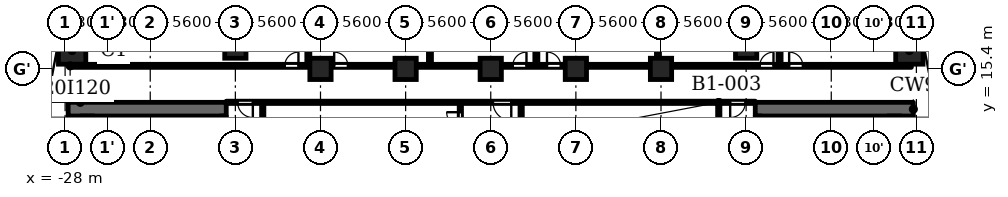
"""IFC4 building model, lengths in metres.
Left out: names, types, materials, properties, quantities, classifications, styles, units other than length and angle.
Written with IfcOpenShell. Run it as: python <this file> out.ifc"""

import sys

from ifc_helpers import new_model, si_unit, direction, frame, frame_2d, origin, origin_2d, place, context, subcontext, project, spatial, polyline, rectangle, outline, extrude, element, fill, save


model = new_model("IFC4")
c1 = context("Model", 3, precision=1e-05, world=origin(), true_north=direction((0.0, 1.0)))
c2 = subcontext(c1, "Body", "Model", "MODEL_VIEW")
j1 = project(units=[si_unit("LENGTHUNIT", "METRE"), si_unit("PLANEANGLEUNIT", "RADIAN")], contexts=[c1])
p1 = place(None, origin())
s1 = spatial("IfcSite", under=j1, at=p1, CompositionType="ELEMENT")
p2 = place(p1, origin())
s2 = spatial("IfcBuilding", under=s1, at=p2, CompositionType="ELEMENT")
p3 = place(p2, frame((0.0, 0.0, -4.5)))
s3 = spatial("IfcBuildingStorey", under=s2, at=p3, CompositionType="ELEMENT", Elevation=-4.5)
p4 = place(p3, frame((0.0, 0.0, -0.5)))
e1 = element("IfcWall", 1, at=p4, inside=s3, PredefinedType="SOLIDWALL", context=c2, shape_type="SweptSolid", body=[
    extrude(outline(polyline([(-29.45, 10.0), (-28.95, 10.0), (-28.95, 14.49), (-28.472, 16.996), (-27.038, 19.105), (-26.144, 20.0), (-26.851, 20.0), (-27.425, 19.426), (-28.944, 17.191), (-29.45, 14.537), (-29.45, 10.0)])), origin(), (0.0, 0.0, 1.0), 5.0),
])
e2 = element("IfcWall", 2, at=p4, inside=s3, PredefinedType="SOLIDWALL", context=c2, shape_type="SweptSolid", body=[
    extrude(outline(polyline([(26.851, 20.0), (26.144, 20.0), (27.038, 19.105), (28.472, 16.996), (28.95, 14.49), (28.95, 10.0), (29.45, 10.0), (29.45, 14.537), (28.944, 17.191), (27.425, 19.426), (26.851, 20.0)])), origin(), (0.0, 0.0, 1.0), 5.0),
])
for number, where, z_axis, x_axis in (
    (3, (27.538, 16.609, 0.0), (0.0, 0.0, 1.0), (1.0, 0.0, 0.0)),
    (4, (-27.538, 16.609, 0.0), (0.0, 0.0, 1.0), (1.0, 0.0, 0.0)),
):
    element("IfcColumn", number, at=place(p3, frame(where, z_axis=z_axis, x_axis=x_axis)), inside=s3, PredefinedType="COLUMN", context=c2, shape_type="SweptSolid", body=[
        extrude(rectangle(XDim=1.8, YDim=1.8, at=origin_2d()), origin(), (0.0, 0.0, 1.0), 4.5),
    ])
for number, where, z_axis, x_axis in (
    (5, (-16.8, 16.8, 0.0), (0.0, 0.0, 1.0), (1.0, 0.0, 0.0)),
    (6, (16.8, 16.8, 0.0), (0.0, 0.0, 1.0), (1.0, 0.0, 0.0)),
    (7, (-11.2, 15.4, 0.0), (0.0, 0.0, 1.0), (1.0, 0.0, 0.0)),
    (8, (-5.6, 15.4, 0.0), (0.0, 0.0, 1.0), (1.0, 0.0, 0.0)),
    (9, (0.0, 15.4, 0.0), (0.0, 0.0, 1.0), (1.0, 0.0, 0.0)),
    (10, (5.6, 15.4, 0.0), (0.0, 0.0, 1.0), (1.0, 0.0, 0.0)),
    (11, (11.2, 15.4, 0.0), (0.0, 0.0, 1.0), (1.0, 0.0, 0.0)),
):
    element("IfcColumn", number, at=place(p3, frame(where, z_axis=z_axis, x_axis=x_axis)), inside=s3, PredefinedType="COLUMN", context=c2, shape_type="SweptSolid", body=[
        extrude(rectangle(XDim=1.4, YDim=1.4, at=origin_2d()), origin(), (0.0, 0.0, 1.0), 4.5),
    ])
p5 = place(p3, frame((-17.4, 12.75, 0.0), z_axis=(0.0, 0.0, 1.0), x_axis=(-1.0, 0.0, 0.0)))
e12 = element("IfcWall", 12, at=p5, inside=s3, PredefinedType="SHEAR", context=c2, shape_type="SweptSolid", body=[
    extrude(rectangle(XDim=10.4, YDim=0.9, at=frame_2d((5.2, 0.0))), origin(), (0.0, 0.0, 1.0), 4.05),
])
p6 = place(p3, frame((-17.6, -12.3, 0.0), z_axis=(0.0, 0.0, 1.0), x_axis=(0.0, 1.0, 0.0)))
e13 = element("IfcWall", 13, at=p6, inside=s3, PredefinedType="SHEAR", context=c2, shape_type="SweptSolid", body=[
    extrude(rectangle(XDim=24.6, YDim=0.4, at=frame_2d((12.3, 0.0))), origin(), (0.0, 0.0, 1.0), 4.05),
])
p7 = place(p6, frame((6.0, 0.0, 0.0)))
e14 = element("IfcOpeningElement", 14, at=p7, cuts=e13, PredefinedType="OPENING", context=c2, shape_type="SweptSolid", body=[
    extrude(rectangle(XDim=1.1, YDim=2.1, at=frame_2d((0.55, 1.05))), frame((0.0, 0.21, 0.0), z_axis=(0.0, -1.0, 0.0), x_axis=(1.0, 0.0, 0.0)), (0.0, 0.0, 1.0), 0.42),
])
p8 = place(p6, frame((8.4, 0.0, 0.0)))
e15 = element("IfcOpeningElement", 15, at=p8, cuts=e13, PredefinedType="OPENING", context=c2, shape_type="SweptSolid", body=[
    extrude(rectangle(XDim=1.1, YDim=2.1, at=frame_2d((0.55, 1.05))), frame((0.0, 0.21, 0.0), z_axis=(0.0, -1.0, 0.0), x_axis=(1.0, 0.0, 0.0)), (0.0, 0.0, 1.0), 0.42),
])
p9 = place(p6, frame((10.8, 0.0, 0.0)))
e16 = element("IfcOpeningElement", 16, at=p9, cuts=e13, PredefinedType="OPENING", context=c2, shape_type="SweptSolid", body=[
    extrude(rectangle(XDim=1.1, YDim=2.1, at=frame_2d((0.55, 1.05))), frame((0.0, 0.21, 0.0), z_axis=(0.0, -1.0, 0.0), x_axis=(1.0, 0.0, 0.0)), (0.0, 0.0, 1.0), 0.42),
])
p10 = place(p6, frame((16.75, 0.0, 0.0)))
e17 = element("IfcOpeningElement", 17, at=p10, cuts=e13, PredefinedType="OPENING", context=c2, shape_type="SweptSolid", body=[
    extrude(rectangle(XDim=0.9, YDim=2.1, at=frame_2d((0.45, 1.05))), frame((0.0, 0.21, 0.0), z_axis=(0.0, -1.0, 0.0), x_axis=(1.0, 0.0, 0.0)), (0.0, 0.0, 1.0), 0.42),
])
p11 = place(p6, frame((22.8, 0.0, 0.0)))
e18 = element("IfcOpeningElement", 18, at=p11, cuts=e13, PredefinedType="OPENING", context=c2, shape_type="SweptSolid", body=[
    extrude(rectangle(XDim=1.1, YDim=2.1, at=frame_2d((0.55, 1.05))), frame((0.0, 0.21, 0.0), z_axis=(0.0, -1.0, 0.0), x_axis=(1.0, 0.0, 0.0)), (0.0, 0.0, 1.0), 0.42),
])
p12 = place(p6, frame((0.7, 0.0, 0.0)))
e19 = element("IfcOpeningElement", 19, at=p12, cuts=e13, PredefinedType="OPENING", context=c2, shape_type="SweptSolid", body=[
    extrude(rectangle(XDim=1.1, YDim=2.1, at=frame_2d((0.55, 1.05))), frame((0.0, 0.21, 0.0), z_axis=(0.0, -1.0, 0.0), x_axis=(1.0, 0.0, 0.0)), (0.0, 0.0, 1.0), 0.42),
])
p13 = place(p6, frame((12.775, 0.0, 0.0)))
e20 = element("IfcOpeningElement", 20, at=p13, cuts=e13, PredefinedType="OPENING", context=c2, shape_type="SweptSolid", body=[
    extrude(rectangle(XDim=1.8, YDim=2.1, at=frame_2d((0.9, 1.05))), frame((0.0, 0.21, 0.0), z_axis=(0.0, -1.0, 0.0), x_axis=(1.0, 0.0, 0.0)), (0.0, 0.0, 1.0), 0.42),
])
p14 = place(p3, frame((-26.55, -12.3, 0.0), z_axis=(0.0, 0.0, 1.0), x_axis=(0.0, 1.0, 0.0)))
e21 = element("IfcWall", 21, at=p14, inside=s3, PredefinedType="SHEAR", context=c2, shape_type="SweptSolid", body=[
    extrude(rectangle(XDim=24.6, YDim=0.9, at=frame_2d((12.3, 0.0))), origin(), (0.0, 0.0, 1.0), 4.05),
])
p15 = place(p3, frame((-23.55, 9.8, 0.0), z_axis=(0.0, 0.0, 1.0), x_axis=(0.0, 1.0, 0.0)))
e22 = element("IfcWall", 22, at=p15, inside=s3, PredefinedType="PARTITIONING", context=c2, shape_type="SweptSolid", body=[
    extrude(rectangle(XDim=2.5, YDim=0.2, at=frame_2d((1.25, 0.0))), origin(), (0.0, 0.0, 1.0), 4.05),
])
p16 = place(p15, frame((0.8, 0.0, 0.0)))
e23 = element("IfcOpeningElement", 23, at=p16, cuts=e22, PredefinedType="OPENING", context=c2, shape_type="SweptSolid", body=[
    extrude(rectangle(XDim=0.9, YDim=2.1, at=frame_2d((0.45, 1.05))), frame((0.0, 0.11, 0.0), z_axis=(0.0, -1.0, 0.0), x_axis=(1.0, 0.0, 0.0)), (0.0, 0.0, 1.0), 0.22),
])
p17 = place(p3, frame((17.4, 12.75, 0.0), z_axis=(0.0, 0.0, 1.0), x_axis=(1.0, 0.0, 0.0)))
e24 = element("IfcWall", 24, at=p17, inside=s3, PredefinedType="SHEAR", context=c2, shape_type="SweptSolid", body=[
    extrude(rectangle(XDim=10.4, YDim=0.9, at=frame_2d((5.2, 0.0))), origin(), (0.0, 0.0, 1.0), 4.05),
])
p18 = place(p3, frame((17.6, -12.3, 0.0), z_axis=(0.0, 0.0, 1.0), x_axis=(0.0, 1.0, 0.0)))
e25 = element("IfcWall", 25, at=p18, inside=s3, PredefinedType="SHEAR", context=c2, shape_type="SweptSolid", body=[
    extrude(rectangle(XDim=24.6, YDim=0.4, at=frame_2d((12.3, 0.0))), origin(), (0.0, 0.0, 1.0), 4.05),
])
p19 = place(p18, frame((6.0, 0.0, 0.0)))
e26 = element("IfcOpeningElement", 26, at=p19, cuts=e25, PredefinedType="OPENING", context=c2, shape_type="SweptSolid", body=[
    extrude(rectangle(XDim=1.1, YDim=2.1, at=frame_2d((0.55, 1.05))), frame((0.0, 0.21, 0.0), z_axis=(0.0, -1.0, 0.0), x_axis=(1.0, 0.0, 0.0)), (0.0, 0.0, 1.0), 0.42),
])
p20 = place(p18, frame((8.4, 0.0, 0.0)))
e27 = element("IfcOpeningElement", 27, at=p20, cuts=e25, PredefinedType="OPENING", context=c2, shape_type="SweptSolid", body=[
    extrude(rectangle(XDim=1.1, YDim=2.1, at=frame_2d((0.55, 1.05))), frame((0.0, 0.21, 0.0), z_axis=(0.0, -1.0, 0.0), x_axis=(1.0, 0.0, 0.0)), (0.0, 0.0, 1.0), 0.42),
])
p21 = place(p18, frame((10.8, 0.0, 0.0)))
e28 = element("IfcOpeningElement", 28, at=p21, cuts=e25, PredefinedType="OPENING", context=c2, shape_type="SweptSolid", body=[
    extrude(rectangle(XDim=1.1, YDim=2.1, at=frame_2d((0.55, 1.05))), frame((0.0, 0.21, 0.0), z_axis=(0.0, -1.0, 0.0), x_axis=(1.0, 0.0, 0.0)), (0.0, 0.0, 1.0), 0.42),
])
p22 = place(p18, frame((16.75, 0.0, 0.0)))
e29 = element("IfcOpeningElement", 29, at=p22, cuts=e25, PredefinedType="OPENING", context=c2, shape_type="SweptSolid", body=[
    extrude(rectangle(XDim=0.9, YDim=2.1, at=frame_2d((0.45, 1.05))), frame((0.0, 0.21, 0.0), z_axis=(0.0, -1.0, 0.0), x_axis=(1.0, 0.0, 0.0)), (0.0, 0.0, 1.0), 0.42),
])
p23 = place(p18, frame((22.8, 0.0, 0.0)))
e30 = element("IfcOpeningElement", 30, at=p23, cuts=e25, PredefinedType="OPENING", context=c2, shape_type="SweptSolid", body=[
    extrude(rectangle(XDim=1.1, YDim=2.1, at=frame_2d((0.55, 1.05))), frame((0.0, 0.21, 0.0), z_axis=(0.0, -1.0, 0.0), x_axis=(1.0, 0.0, 0.0)), (0.0, 0.0, 1.0), 0.42),
])
p24 = place(p18, frame((0.7, 0.0, 0.0)))
e31 = element("IfcOpeningElement", 31, at=p24, cuts=e25, PredefinedType="OPENING", context=c2, shape_type="SweptSolid", body=[
    extrude(rectangle(XDim=1.1, YDim=2.1, at=frame_2d((0.55, 1.05))), frame((0.0, 0.21, 0.0), z_axis=(0.0, -1.0, 0.0), x_axis=(1.0, 0.0, 0.0)), (0.0, 0.0, 1.0), 0.42),
])
p25 = place(p18, frame((12.775, 0.0, 0.0)))
e32 = element("IfcOpeningElement", 32, at=p25, cuts=e25, PredefinedType="OPENING", context=c2, shape_type="SweptSolid", body=[
    extrude(rectangle(XDim=1.8, YDim=2.1, at=frame_2d((0.9, 1.05))), frame((0.0, 0.21, 0.0), z_axis=(0.0, -1.0, 0.0), x_axis=(1.0, 0.0, 0.0)), (0.0, 0.0, 1.0), 0.42),
])
p26 = place(p3, frame((26.55, -12.3, 0.0), z_axis=(0.0, 0.0, 1.0), x_axis=(0.0, 1.0, 0.0)))
e33 = element("IfcWall", 33, at=p26, inside=s3, PredefinedType="SHEAR", context=c2, shape_type="SweptSolid", body=[
    extrude(rectangle(XDim=24.6, YDim=0.9, at=frame_2d((12.3, 0.0))), origin(), (0.0, 0.0, 1.0), 4.05),
])
p27 = place(p3, frame((23.55, 9.8, 0.0), z_axis=(0.0, 0.0, 1.0), x_axis=(0.0, 1.0, 0.0)))
e34 = element("IfcWall", 34, at=p27, inside=s3, PredefinedType="PARTITIONING", context=c2, shape_type="SweptSolid", body=[
    extrude(rectangle(XDim=2.5, YDim=0.2, at=frame_2d((1.25, 0.0))), origin(), (0.0, 0.0, 1.0), 4.05),
])
p28 = place(p27, frame((0.8, 0.0, 0.0)))
e35 = element("IfcOpeningElement", 35, at=p28, cuts=e34, PredefinedType="OPENING", context=c2, shape_type="SweptSolid", body=[
    extrude(rectangle(XDim=0.9, YDim=2.1, at=frame_2d((0.45, 1.05))), frame((0.0, 0.11, 0.0), z_axis=(0.0, -1.0, 0.0), x_axis=(1.0, 0.0, 0.0)), (0.0, 0.0, 1.0), 0.22),
])
p29 = place(p3, frame((-17.4, 13.2, 0.0), z_axis=(0.0, 0.0, 1.0), x_axis=(1.0, 0.0, 0.0)))
e36 = element("IfcWall", 36, at=p29, inside=s3, PredefinedType="PARTITIONING", context=c2, shape_type="SweptSolid", body=[
    extrude(rectangle(XDim=34.8, YDim=0.15, at=frame_2d((17.4, 0.0))), origin(), (0.0, 0.0, 1.0), 4.05),
])
p30 = place(p29, frame((17.55, 0.0, 0.0)))
e37 = element("IfcOpeningElement", 37, at=p30, cuts=e36, PredefinedType="OPENING", context=c2, shape_type="SweptSolid", body=[
    extrude(rectangle(XDim=1.2, YDim=2.1, at=frame_2d((0.6, 1.05))), frame((0.0, 0.085, 0.0), z_axis=(0.0, -1.0, 0.0), x_axis=(1.0, 0.0, 0.0)), (0.0, 0.0, 1.0), 0.17),
])
p31 = place(p29, frame((0.75, 0.0, 0.0)))
e38 = element("IfcOpeningElement", 38, at=p31, cuts=e36, PredefinedType="OPENING", context=c2, shape_type="SweptSolid", body=[
    extrude(rectangle(XDim=1.0, YDim=2.1, at=frame_2d((0.5, 1.05))), frame((0.0, 0.085, 0.0), z_axis=(0.0, -1.0, 0.0), x_axis=(1.0, 0.0, 0.0)), (0.0, 0.0, 1.0), 0.17),
])
p32 = place(p29, frame((33.15, 0.0, 0.0)))
e39 = element("IfcOpeningElement", 39, at=p32, cuts=e36, PredefinedType="OPENING", context=c2, shape_type="SweptSolid", body=[
    extrude(rectangle(XDim=1.0, YDim=2.1, at=frame_2d((0.5, 1.05))), frame((0.0, 0.085, 0.0), z_axis=(0.0, -1.0, 0.0), x_axis=(1.0, 0.0, 0.0)), (0.0, 0.0, 1.0), 0.17),
])
p33 = place(p3, frame((-27.67, 15.6, 0.0), z_axis=(0.0, 0.0, 1.0), x_axis=(1.0, 0.0, 0.0)))
e40 = element("IfcWall", 40, at=p33, inside=s3, PredefinedType="PARTITIONING", context=c2, shape_type="SweptSolid", body=[
    extrude(rectangle(XDim=55.34, YDim=0.2, at=frame_2d((27.67, 0.0))), origin(), (0.0, 0.0, 1.0), 4.05),
])
p34 = place(p33, frame((14.12, 0.0, 0.0)))
e41 = element("IfcOpeningElement", 41, at=p34, cuts=e40, PredefinedType="OPENING", context=c2, shape_type="SweptSolid", body=[
    extrude(rectangle(XDim=0.9, YDim=2.1, at=frame_2d((0.45, 1.05))), frame((0.0, 0.11, 0.0), z_axis=(0.0, -1.0, 0.0), x_axis=(1.0, 0.0, 0.0)), (0.0, 0.0, 1.0), 0.22),
])
p35 = place(p33, frame((17.37, 0.0, 0.0)))
e42 = element("IfcOpeningElement", 42, at=p35, cuts=e40, PredefinedType="OPENING", context=c2, shape_type="SweptSolid", body=[
    extrude(rectangle(XDim=0.9, YDim=2.1, at=frame_2d((0.45, 1.05))), frame((0.0, 0.11, 0.0), z_axis=(0.0, -1.0, 0.0), x_axis=(1.0, 0.0, 0.0)), (0.0, 0.0, 1.0), 0.22),
])
p36 = place(p33, frame((29.12, 0.0, 0.0)))
e43 = element("IfcOpeningElement", 43, at=p36, cuts=e40, PredefinedType="OPENING", context=c2, shape_type="SweptSolid", body=[
    extrude(rectangle(XDim=0.9, YDim=2.1, at=frame_2d((0.45, 1.05))), frame((0.0, 0.11, 0.0), z_axis=(0.0, -1.0, 0.0), x_axis=(1.0, 0.0, 0.0)), (0.0, 0.0, 1.0), 0.22),
])
p37 = place(p33, frame((31.37, 0.0, 0.0)))
e44 = element("IfcOpeningElement", 44, at=p37, cuts=e40, PredefinedType="OPENING", context=c2, shape_type="SweptSolid", body=[
    extrude(rectangle(XDim=0.9, YDim=2.1, at=frame_2d((0.45, 1.05))), frame((0.0, 0.11, 0.0), z_axis=(0.0, -1.0, 0.0), x_axis=(1.0, 0.0, 0.0)), (0.0, 0.0, 1.0), 0.22),
])
p38 = place(p33, frame((45.37, 0.0, 0.0)))
e45 = element("IfcOpeningElement", 45, at=p38, cuts=e40, PredefinedType="OPENING", context=c2, shape_type="SweptSolid", body=[
    extrude(rectangle(XDim=0.9, YDim=2.1, at=frame_2d((0.45, 1.05))), frame((0.0, 0.11, 0.0), z_axis=(0.0, -1.0, 0.0), x_axis=(1.0, 0.0, 0.0)), (0.0, 0.0, 1.0), 0.22),
])
p39 = place(p33, frame((47.299, 0.0, 0.0)))
e46 = element("IfcOpeningElement", 46, at=p39, cuts=e40, PredefinedType="OPENING", context=c2, shape_type="SweptSolid", body=[
    extrude(rectangle(XDim=0.9, YDim=2.1, at=frame_2d((0.45, 1.05))), frame((0.0, 0.11, 0.0), z_axis=(0.0, -1.0, 0.0), x_axis=(1.0, 0.0, 0.0)), (0.0, 0.0, 1.0), 0.22),
])
p40 = place(p3, frame((-15.0, -13.125, 0.0), z_axis=(0.0, 0.0, 1.0), x_axis=(0.0, 1.0, 0.0)))
e47 = element("IfcWall", 47, at=p40, inside=s3, PredefinedType="PARTITIONING", context=c2, shape_type="SweptSolid", body=[
    extrude(rectangle(XDim=26.25, YDim=0.15, at=frame_2d((13.125, 0.0))), origin(), (0.0, 0.0, 1.0), 4.05),
])
p41 = place(p40, frame((11.375, 0.0, 0.0)))
e48 = element("IfcOpeningElement", 48, at=p41, cuts=e47, PredefinedType="OPENING", context=c2, shape_type="SweptSolid", body=[
    extrude(rectangle(XDim=1.0, YDim=2.1, at=frame_2d((0.5, 1.05))), frame((0.0, 0.085, 0.0), z_axis=(0.0, -1.0, 0.0), x_axis=(1.0, 0.0, 0.0)), (0.0, 0.0, 1.0), 0.17),
])
for number, where, z_axis, x_axis in (
    (49, (-12.0, 15.7, 0.0), (0.0, 0.0, 1.0), (0.0, 1.0, 0.0)),
    (50, (-4.0, 15.7, 0.0), (0.0, 0.0, 1.0), (0.0, 1.0, 0.0)),
):
    element("IfcWall", number, at=place(p3, frame(where, z_axis=z_axis, x_axis=x_axis)), inside=s3, PredefinedType="PARTITIONING", context=c2, shape_type="SweptSolid", body=[
        extrude(rectangle(XDim=6.61, YDim=0.2, at=frame_2d((3.305, 0.0))), origin(), (0.0, 0.0, 1.0), 4.05),
    ])
p42 = place(p3, frame((-2.0, 2.475, 0.0), z_axis=(0.0, 0.0, 1.0), x_axis=(0.0, 1.0, 0.0)))
e51 = element("IfcWall", 51, at=p42, inside=s3, PredefinedType="PARTITIONING", context=c2, shape_type="SweptSolid", body=[
    extrude(rectangle(XDim=10.65, YDim=0.15, at=frame_2d((5.325, 0.0))), origin(), (0.0, 0.0, 1.0), 4.05),
])
p43 = place(p42, frame((9.175, 0.0, 0.0)))
e52 = element("IfcOpeningElement", 52, at=p43, cuts=e51, PredefinedType="OPENING", context=c2, shape_type="SweptSolid", body=[
    extrude(rectangle(XDim=0.9, YDim=2.1, at=frame_2d((0.45, 1.05))), frame((0.0, 0.085, 0.0), z_axis=(0.0, -1.0, 0.0), x_axis=(1.0, 0.0, 0.0)), (0.0, 0.0, 1.0), 0.17),
])
p44 = place(p3, frame((2.0, 2.475, 0.0), z_axis=(0.0, 0.0, 1.0), x_axis=(0.0, 1.0, 0.0)))
e53 = element("IfcWall", 53, at=p44, inside=s3, PredefinedType="PARTITIONING", context=c2, shape_type="SweptSolid", body=[
    extrude(rectangle(XDim=10.65, YDim=0.15, at=frame_2d((5.325, 0.0))), origin(), (0.0, 0.0, 1.0), 4.05),
])
p45 = place(p44, frame((8.325, 0.0, 0.0)))
e54 = element("IfcOpeningElement", 54, at=p45, cuts=e53, PredefinedType="OPENING", context=c2, shape_type="SweptSolid", body=[
    extrude(rectangle(XDim=0.9, YDim=2.1, at=frame_2d((0.45, 1.05))), frame((0.0, 0.085, 0.0), z_axis=(0.0, -1.0, 0.0), x_axis=(1.0, 0.0, 0.0)), (0.0, 0.0, 1.0), 0.17),
])
for number, where, z_axis, x_axis in (
    (55, (3.0, 15.7, 0.0), (0.0, 0.0, 1.0), (0.0, 1.0, 0.0)),
    (56, (11.0, 15.7, 0.0), (0.0, 0.0, 1.0), (0.0, 1.0, 0.0)),
):
    element("IfcWall", number, at=place(p3, frame(where, z_axis=z_axis, x_axis=x_axis)), inside=s3, PredefinedType="PARTITIONING", context=c2, shape_type="SweptSolid", body=[
        extrude(rectangle(XDim=6.61, YDim=0.2, at=frame_2d((3.305, 0.0))), origin(), (0.0, 0.0, 1.0), 4.05),
    ])
p46 = place(p3, frame((15.0, -13.125, 0.0), z_axis=(0.0, 0.0, 1.0), x_axis=(0.0, 1.0, 0.0)))
e57 = element("IfcWall", 57, at=p46, inside=s3, PredefinedType="PARTITIONING", context=c2, shape_type="SweptSolid", body=[
    extrude(rectangle(XDim=26.25, YDim=0.15, at=frame_2d((13.125, 0.0))), origin(), (0.0, 0.0, 1.0), 4.05),
])
p47 = place(p46, frame((11.375, 0.0, 0.0)))
e58 = element("IfcOpeningElement", 58, at=p47, cuts=e57, PredefinedType="OPENING", context=c2, shape_type="SweptSolid", body=[
    extrude(rectangle(XDim=1.0, YDim=2.1, at=frame_2d((0.5, 1.05))), frame((0.0, 0.085, 0.0), z_axis=(0.0, -1.0, 0.0), x_axis=(1.0, 0.0, 0.0)), (0.0, 0.0, 1.0), 0.17),
])
p48 = place(p3, frame((19.0, 15.7, 0.0), z_axis=(0.0, 0.0, 1.0), x_axis=(0.0, 1.0, 0.0)))
e59 = element("IfcWall", 59, at=p48, inside=s3, PredefinedType="PARTITIONING", context=c2, shape_type="SweptSolid", body=[
    extrude(rectangle(XDim=6.61, YDim=0.2, at=frame_2d((3.305, 0.0))), origin(), (0.0, 0.0, 1.0), 4.05),
])
p49 = place(p30, origin())
e60 = element("IfcDoor", 60, at=p49, inside=s3, OperationType="SINGLE_SWING_RIGHT", PredefinedType="DOOR", context=c2, shape_type="SweptSolid", body=[
    extrude(rectangle(XDim=1.2, YDim=2.1, at=frame_2d((0.6, 1.05))), frame((0.0, 0.025, 0.0), z_axis=(0.0, -1.0, 0.0), x_axis=(1.0, 0.0, 0.0)), (0.0, 0.0, 1.0), 0.05),
])
fill(e37, e60)
p50 = place(p31, origin())
e61 = element("IfcDoor", 61, at=p50, inside=s3, OperationType="SINGLE_SWING_RIGHT", PredefinedType="DOOR", context=c2, shape_type="SweptSolid", body=[
    extrude(rectangle(XDim=1.0, YDim=2.1, at=frame_2d((0.5, 1.05))), frame((0.0, 0.025, 0.0), z_axis=(0.0, -1.0, 0.0), x_axis=(1.0, 0.0, 0.0)), (0.0, 0.0, 1.0), 0.05),
])
fill(e38, e61)
p51 = place(p32, origin())
e62 = element("IfcDoor", 62, at=p51, inside=s3, OperationType="SINGLE_SWING_LEFT", PredefinedType="DOOR", context=c2, shape_type="SweptSolid", body=[
    extrude(rectangle(XDim=1.0, YDim=2.1, at=frame_2d((0.5, 1.05))), frame((0.0, 0.025, 0.0), z_axis=(0.0, -1.0, 0.0), x_axis=(1.0, 0.0, 0.0)), (0.0, 0.0, 1.0), 0.05),
])
fill(e39, e62)
p52 = place(p34, origin())
e63 = element("IfcDoor", 63, at=p52, inside=s3, OperationType="SINGLE_SWING_LEFT", PredefinedType="DOOR", context=c2, shape_type="SweptSolid", body=[
    extrude(rectangle(XDim=0.9, YDim=2.1, at=frame_2d((0.45, 1.05))), frame((0.0, 0.025, 0.0), z_axis=(0.0, -1.0, 0.0), x_axis=(1.0, 0.0, 0.0)), (0.0, 0.0, 1.0), 0.05),
])
fill(e41, e63)
p53 = place(p35, origin())
e64 = element("IfcDoor", 64, at=p53, inside=s3, OperationType="SINGLE_SWING_RIGHT", PredefinedType="DOOR", context=c2, shape_type="SweptSolid", body=[
    extrude(rectangle(XDim=0.9, YDim=2.1, at=frame_2d((0.45, 1.05))), frame((0.0, 0.025, 0.0), z_axis=(0.0, -1.0, 0.0), x_axis=(1.0, 0.0, 0.0)), (0.0, 0.0, 1.0), 0.05),
])
fill(e42, e64)
p54 = place(p36, origin())
e65 = element("IfcDoor", 65, at=p54, inside=s3, OperationType="SINGLE_SWING_LEFT", PredefinedType="DOOR", context=c2, shape_type="SweptSolid", body=[
    extrude(rectangle(XDim=0.9, YDim=2.1, at=frame_2d((0.45, 1.05))), frame((0.0, 0.025, 0.0), z_axis=(0.0, -1.0, 0.0), x_axis=(1.0, 0.0, 0.0)), (0.0, 0.0, 1.0), 0.05),
])
fill(e43, e65)
p55 = place(p37, origin())
e66 = element("IfcDoor", 66, at=p55, inside=s3, OperationType="SINGLE_SWING_RIGHT", PredefinedType="DOOR", context=c2, shape_type="SweptSolid", body=[
    extrude(rectangle(XDim=0.9, YDim=2.1, at=frame_2d((0.45, 1.05))), frame((0.0, 0.025, 0.0), z_axis=(0.0, -1.0, 0.0), x_axis=(1.0, 0.0, 0.0)), (0.0, 0.0, 1.0), 0.05),
])
fill(e44, e66)
p56 = place(p38, origin())
e67 = element("IfcDoor", 67, at=p56, inside=s3, OperationType="SINGLE_SWING_LEFT", PredefinedType="DOOR", context=c2, shape_type="SweptSolid", body=[
    extrude(rectangle(XDim=0.9, YDim=2.1, at=frame_2d((0.45, 1.05))), frame((0.0, 0.025, 0.0), z_axis=(0.0, -1.0, 0.0), x_axis=(1.0, 0.0, 0.0)), (0.0, 0.0, 1.0), 0.05),
])
fill(e45, e67)
p57 = place(p39, origin())
e68 = element("IfcDoor", 68, at=p57, inside=s3, OperationType="SINGLE_SWING_RIGHT", PredefinedType="DOOR", context=c2, shape_type="SweptSolid", body=[
    extrude(rectangle(XDim=0.9, YDim=2.1, at=frame_2d((0.45, 1.05))), frame((0.0, 0.025, 0.0), z_axis=(0.0, -1.0, 0.0), x_axis=(1.0, 0.0, 0.0)), (0.0, 0.0, 1.0), 0.05),
])
fill(e46, e68)
p58 = place(p43, origin())
e69 = element("IfcDoor", 69, at=p58, inside=s3, OperationType="SINGLE_SWING_LEFT", PredefinedType="DOOR", context=c2, shape_type="SweptSolid", body=[
    extrude(rectangle(XDim=0.9, YDim=2.1, at=frame_2d((0.45, 1.05))), frame((0.0, 0.025, 0.0), z_axis=(0.0, -1.0, 0.0), x_axis=(1.0, 0.0, 0.0)), (0.0, 0.0, 1.0), 0.05),
])
fill(e52, e69)
save(model, sys.argv[1])
